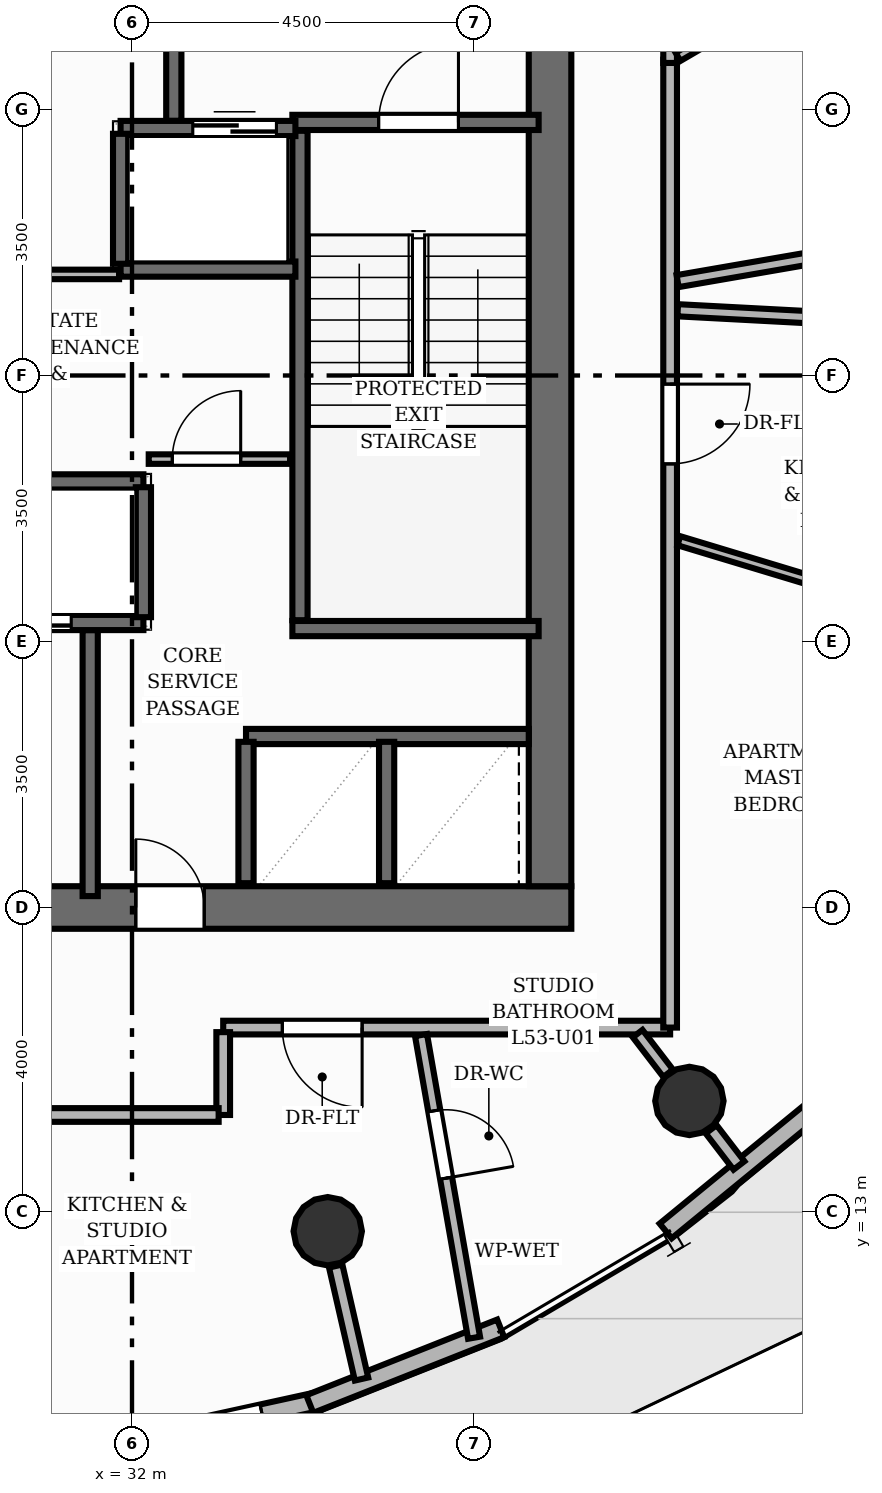
"""IFC4 building model, lengths in metres.
Left out: names, types, materials, properties, quantities, classifications, styles, units other than length and angle.
Written with IfcOpenShell. Run it as: python <this file> out.ifc"""

import sys

from ifc_helpers import new_model, si_unit, direction, frame, frame_2d, origin, origin_2d, place, context, subcontext, project, spatial, rectangle, circle, extrude, element, fill, save


model = new_model("IFC4")
c1 = context("Model", 3, precision=1e-05, world=origin(), true_north=direction((0.0, 1.0)))
c2 = subcontext(c1, "Body", "Model", "MODEL_VIEW")
j1 = project(units=[si_unit("LENGTHUNIT", "METRE"), si_unit("PLANEANGLEUNIT", "RADIAN")], contexts=[c1])
p1 = place(None, origin())
s1 = spatial("IfcSite", under=j1, at=p1, CompositionType="ELEMENT")
p2 = place(p1, origin())
s2 = spatial("IfcBuilding", under=s1, at=p2, CompositionType="ELEMENT")
p3 = place(p2, frame((0.0, 0.0, 179.04)))
s3 = spatial("IfcBuildingStorey", under=s2, at=p3, CompositionType="ELEMENT", Elevation=179.04)
p4 = place(p3, frame((26.22, 17.0, 0.0), z_axis=(0.0, 0.0, 1.0), x_axis=(1.0, 0.0, 0.0)))
e1 = element("IfcWall", 1, at=p4, inside=s3, PredefinedType="SHEAR", context=c2, shape_type="SweptSolid", body=[
    extrude(rectangle(XDim=11.56, YDim=0.56, at=frame_2d((5.78, 0.0))), origin(), (0.0, 0.0, 1.0), 3.2),
])
p5 = place(p4, frame((2.28, 0.0, 0.0)))
e2 = element("IfcOpeningElement", 2, at=p5, cuts=e1, PredefinedType="OPENING", context=c2, shape_type="SweptSolid", body=[
    extrude(rectangle(XDim=1.1, YDim=2.15, at=frame_2d((0.55, 1.075))), frame((0.0, 0.29, 0.0), z_axis=(0.0, -1.0, 0.0), x_axis=(1.0, 0.0, 0.0)), (0.0, 0.0, 1.0), 0.58),
])
p6 = place(p4, frame((5.83, 0.0, 0.0)))
e3 = element("IfcOpeningElement", 3, at=p6, cuts=e1, PredefinedType="OPENING", context=c2, shape_type="SweptSolid", body=[
    extrude(rectangle(XDim=0.9, YDim=2.1, at=frame_2d((0.45, 1.05))), frame((0.0, 0.29, 0.0), z_axis=(0.0, -1.0, 0.0), x_axis=(1.0, 0.0, 0.0)), (0.0, 0.0, 1.0), 0.58),
])
p7 = place(p3, frame((37.5, 17.28, 0.0), z_axis=(0.0, 0.0, 1.0), x_axis=(0.0, 1.0, 0.0)))
e4 = element("IfcWall", 4, at=p7, inside=s3, PredefinedType="SHEAR", context=c2, shape_type="SweptSolid", body=[
    extrude(rectangle(XDim=13.44, YDim=0.56, at=frame_2d((6.72, 0.0))), origin(), (0.0, 0.0, 1.0), 3.2),
])
for number, where, z_axis, x_axis in (
    (5, (34.575, 12.74, 0.0), (0.0, 0.0, 1.0), (1.0, 0.0, 0.0)),
    (6, (39.333, 14.455, 0.0), (0.0, 0.0, 1.0), (1.0, 0.0, 0.0)),
):
    element("IfcColumn", number, at=place(p3, frame(where, z_axis=z_axis, x_axis=x_axis)), inside=s3, PredefinedType="COLUMN", context=c2, shape_type="SweptSolid", body=[
        extrude(circle(Radius=0.45, at=origin_2d()), origin(), (0.0, 0.0, 1.0), 3.2),
    ])
p8 = place(p3, frame((34.444, 10.499, 0.0), z_axis=(0.0, 0.0, 1.0), x_axis=(-0.976886196324, -0.213760051067, 0.0)))
e7 = element("IfcWall", 7, at=p8, inside=s3, PredefinedType="SOLIDWALL", context=c2, shape_type="SweptSolid", body=[
    extrude(rectangle(XDim=2.651, YDim=0.25, at=frame_2d((1.325, 0.0))), origin(), (0.0, 0.0, 1.0), 2.96),
])
p9 = place(p8, frame((0.751, 0.0, 0.0)))
e8 = element("IfcOpeningElement", 8, at=p9, cuts=e7, PredefinedType="OPENING", context=c2, shape_type="SweptSolid", body=[
    extrude(rectangle(XDim=1.15, YDim=2.2, at=frame_2d((0.575, 1.1))), frame((0.0, 0.135, 0.0), z_axis=(0.0, -1.0, 0.0), x_axis=(1.0, 0.0, 0.0)), (0.0, 0.0, 1.0), 0.27),
])
p10 = place(p3, frame((36.851, 11.462, 0.0), z_axis=(0.0, 0.0, 1.0), x_axis=(-0.929693178164, -0.368334894459, 0.0)))
e9 = element("IfcWall", 9, at=p10, inside=s3, PredefinedType="SOLIDWALL", context=c2, shape_type="SweptSolid", body=[
    extrude(rectangle(XDim=2.702, YDim=0.25, at=frame_2d((1.351, 0.0))), origin(), (0.0, 0.0, 1.0), 2.96),
])
p11 = place(p3, frame((41.155, 14.492, 0.0), z_axis=(0.0, 0.0, 1.0), x_axis=(-0.773491700486, -0.633806428872, 0.0)))
e10 = element("IfcWall", 10, at=p11, inside=s3, PredefinedType="SOLIDWALL", context=c2, shape_type="SweptSolid", body=[
    extrude(rectangle(XDim=2.758, YDim=0.25, at=frame_2d((1.379, 0.0))), origin(), (0.0, 0.0, 1.0), 2.96),
])
p12 = place(p3, frame((34.21, 20.78, 0.0), z_axis=(0.0, 0.0, 1.0), x_axis=(0.0, 1.0, 0.0)))
e11 = element("IfcWall", 11, at=p12, inside=s3, PredefinedType="SHEAR", context=c2, shape_type="SweptSolid", body=[
    extrude(rectangle(XDim=6.44, YDim=0.2, at=frame_2d((3.22, 0.0))), origin(), (0.0, 0.0, 1.0), 3.2),
])
p13 = place(p3, frame((34.11, 20.67, 0.0), z_axis=(0.0, 0.0, 1.0), x_axis=(1.0, 0.0, 0.0)))
e12 = element("IfcWall", 12, at=p13, inside=s3, PredefinedType="SHEAR", context=c2, shape_type="SweptSolid", body=[
    extrude(rectangle(XDim=3.24, YDim=0.2, at=frame_2d((1.62, 0.0))), origin(), (0.0, 0.0, 1.0), 3.2),
])
p14 = place(p3, frame((34.11, 27.33, 0.0), z_axis=(0.0, 0.0, 1.0), x_axis=(1.0, 0.0, 0.0)))
e13 = element("IfcWall", 13, at=p14, inside=s3, PredefinedType="SHEAR", context=c2, shape_type="SweptSolid", body=[
    extrude(rectangle(XDim=3.24, YDim=0.2, at=frame_2d((1.62, 0.0))), origin(), (0.0, 0.0, 1.0), 3.2),
])
p15 = place(p14, frame((1.135, 0.0, 0.0)))
e14 = element("IfcOpeningElement", 14, at=p15, cuts=e13, PredefinedType="OPENING", context=c2, shape_type="SweptSolid", body=[
    extrude(rectangle(XDim=1.05, YDim=2.15, at=frame_2d((0.525, 1.075))), frame((0.0, 0.11, 0.0), z_axis=(0.0, -1.0, 0.0), x_axis=(1.0, 0.0, 0.0)), (0.0, 0.0, 1.0), 0.22),
])
for number, where, z_axis, x_axis in (
    (15, (31.45, 17.15, 0.0), (0.0, 0.0, 1.0), (0.0, 1.0, 0.0)),
    (16, (32.55, 27.35, 0.0), (0.0, 0.0, 1.0), (0.0, 1.0, 0.0)),
):
    element("IfcWall", number, at=place(p3, frame(where, z_axis=z_axis, x_axis=x_axis)), inside=s3, PredefinedType="SHEAR", context=c2, shape_type="SweptSolid", body=[
        extrude(rectangle(XDim=3.5, YDim=0.2, at=frame_2d((1.75, 0.0))), origin(), (0.0, 0.0, 1.0), 3.2),
    ])
p16 = place(p3, frame((29.85, 20.75, 0.0), z_axis=(0.0, 0.0, 1.0), x_axis=(1.0, 0.0, 0.0)))
e17 = element("IfcWall", 17, at=p16, inside=s3, PredefinedType="SHEAR", context=c2, shape_type="SweptSolid", body=[
    extrude(rectangle(XDim=2.3, YDim=0.2, at=frame_2d((1.15, 0.0))), origin(), (0.0, 0.0, 1.0), 3.2),
])
p17 = place(p16, frame((0.25, 0.0, 0.0)))
e18 = element("IfcOpeningElement", 18, at=p17, cuts=e17, PredefinedType="OPENING", context=c2, shape_type="SweptSolid", body=[
    extrude(rectangle(XDim=1.1, YDim=2.15, at=frame_2d((0.55, 1.075))), frame((0.0, 0.11, 0.0), z_axis=(0.0, -1.0, 0.0), x_axis=(1.0, 0.0, 0.0)), (0.0, 0.0, 1.0), 0.22),
])
p18 = place(p3, frame((29.85, 22.6, 0.0), z_axis=(0.0, 0.0, 1.0), x_axis=(1.0, 0.0, 0.0)))
e19 = element("IfcWall", 19, at=p18, inside=s3, PredefinedType="SHEAR", context=c2, shape_type="SweptSolid", body=[
    extrude(rectangle(XDim=2.3, YDim=0.2, at=frame_2d((1.15, 0.0))), origin(), (0.0, 0.0, 1.0), 3.2),
])
p19 = place(p3, frame((32.15, 20.82, 0.0), z_axis=(0.0, 0.0, 1.0), x_axis=(0.0, 1.0, 0.0)))
e20 = element("IfcWall", 20, at=p19, inside=s3, PredefinedType="SHEAR", context=c2, shape_type="SweptSolid", body=[
    extrude(rectangle(XDim=1.71, YDim=0.2, at=frame_2d((0.855, 0.0))), origin(), (0.0, 0.0, 1.0), 3.2),
])
p20 = place(p3, frame((31.85, 27.25, 0.0), z_axis=(0.0, 0.0, 1.0), x_axis=(1.0, 0.0, 0.0)))
e21 = element("IfcWall", 21, at=p20, inside=s3, PredefinedType="SHEAR", context=c2, shape_type="SweptSolid", body=[
    extrude(rectangle(XDim=2.3, YDim=0.2, at=frame_2d((1.15, 0.0))), origin(), (0.0, 0.0, 1.0), 3.2),
])
p21 = place(p20, frame((0.95, 0.0, 0.0)))
e22 = element("IfcOpeningElement", 22, at=p21, cuts=e21, PredefinedType="OPENING", context=c2, shape_type="SweptSolid", body=[
    extrude(rectangle(XDim=1.1, YDim=2.15, at=frame_2d((0.55, 1.075))), frame((0.0, 0.11, 0.0), z_axis=(0.0, -1.0, 0.0), x_axis=(1.0, 0.0, 0.0)), (0.0, 0.0, 1.0), 0.22),
])
p22 = place(p3, frame((31.85, 25.4, 0.0), z_axis=(0.0, 0.0, 1.0), x_axis=(1.0, 0.0, 0.0)))
e23 = element("IfcWall", 23, at=p22, inside=s3, PredefinedType="SHEAR", context=c2, shape_type="SweptSolid", body=[
    extrude(rectangle(XDim=2.3, YDim=0.2, at=frame_2d((1.15, 0.0))), origin(), (0.0, 0.0, 1.0), 3.2),
])
p23 = place(p3, frame((31.85, 25.47, 0.0), z_axis=(0.0, 0.0, 1.0), x_axis=(0.0, 1.0, 0.0)))
e24 = element("IfcWall", 24, at=p23, inside=s3, PredefinedType="SHEAR", context=c2, shape_type="SweptSolid", body=[
    extrude(rectangle(XDim=1.71, YDim=0.2, at=frame_2d((0.855, 0.0))), origin(), (0.0, 0.0, 1.0), 3.2),
])
p24 = place(p3, frame((33.5, 19.25, 0.0), z_axis=(0.0, 0.0, 1.0), x_axis=(1.0, 0.0, 0.0)))
e25 = element("IfcWall", 25, at=p24, inside=s3, PredefinedType="SHEAR", context=c2, shape_type="SweptSolid", body=[
    extrude(rectangle(XDim=3.72, YDim=0.2, at=frame_2d((1.86, 0.0))), origin(), (0.0, 0.0, 1.0), 3.2),
])
for number, where, z_axis, x_axis in (
    (26, (33.5, 17.32, 0.0), (0.0, 0.0, 1.0), (0.0, 1.0, 0.0)),
    (27, (35.35, 17.32, 0.0), (0.0, 0.0, 1.0), (0.0, 1.0, 0.0)),
):
    element("IfcWall", number, at=place(p3, frame(where, z_axis=z_axis, x_axis=x_axis)), inside=s3, PredefinedType="SHEAR", context=c2, shape_type="SweptSolid", body=[
        extrude(rectangle(XDim=1.86, YDim=0.2, at=frame_2d((0.93, 0.0))), origin(), (0.0, 0.0, 1.0), 3.2),
    ])
p25 = place(p3, frame((32.22, 22.9, 0.0), z_axis=(0.0, 0.0, 1.0), x_axis=(1.0, 0.0, 0.0)))
e28 = element("IfcWall", 28, at=p25, inside=s3, PredefinedType="PARTITIONING", context=c2, shape_type="SweptSolid", body=[
    extrude(rectangle(XDim=1.86, YDim=0.125, at=frame_2d((0.93, 0.0))), origin(), (0.0, 0.0, 1.0), 2.955),
])
p26 = place(p25, frame((0.31, 0.0, 0.0)))
e29 = element("IfcOpeningElement", 29, at=p26, cuts=e28, PredefinedType="OPENING", context=c2, shape_type="SweptSolid", body=[
    extrude(rectangle(XDim=0.9, YDim=2.1, at=frame_2d((0.45, 1.05))), frame((0.0, 0.073, 0.0), z_axis=(0.0, -1.0, 0.0), x_axis=(1.0, 0.0, 0.0)), (0.0, 0.0, 1.0), 0.145),
])
p27 = place(p3, frame((29.89, 25.33, 0.0), z_axis=(0.0, 0.0, 1.0), x_axis=(1.0, 0.0, 0.0)))
e30 = element("IfcWall", 30, at=p27, inside=s3, PredefinedType="PARTITIONING", context=c2, shape_type="SweptSolid", body=[
    extrude(rectangle(XDim=1.94, YDim=0.125, at=frame_2d((0.97, 0.0))), origin(), (0.0, 0.0, 1.0), 2.955),
])
p28 = place(p3, frame((34.68, 12.282, 0.0), z_axis=(0.0, 0.0, 1.0), x_axis=(0.222976920769, -0.974823723965, 0.0)))
e31 = element("IfcWall", 31, at=p28, inside=s3, PredefinedType="PARTITIONING", context=c2, shape_type="SweptSolid", body=[
    extrude(rectangle(XDim=1.525, YDim=0.18, at=frame_2d((0.763, 0.0))), origin(), (0.0, 0.0, 1.0), 2.403),
])
p29 = place(p3, frame((39.62, 14.082, 0.0), z_axis=(0.0, 0.0, 1.0), x_axis=(0.609062571598, -0.793122174623, 0.0)))
e32 = element("IfcWall", 32, at=p29, inside=s3, PredefinedType="PARTITIONING", context=c2, shape_type="SweptSolid", body=[
    extrude(rectangle(XDim=0.601, YDim=0.18, at=frame_2d((0.3, 0.0))), origin(), (0.0, 0.0, 1.0), 2.403),
])
p30 = place(p3, frame((39.08, 15.42, 0.0), z_axis=(0.0, 0.0, 1.0), x_axis=(-1.0, 0.0, 0.0)))
e33 = element("IfcWall", 33, at=p30, inside=s3, PredefinedType="PARTITIONING", context=c2, shape_type="SweptSolid", body=[
    extrude(rectangle(XDim=5.88, YDim=0.18, at=frame_2d((2.94, 0.0))), origin(), (0.0, 0.0, 1.0), 2.955),
])
p31 = place(p30, frame((4.052, 0.0, 0.0)))
e34 = element("IfcOpeningElement", 34, at=p31, cuts=e33, PredefinedType="OPENING", context=c2, shape_type="SweptSolid", body=[
    extrude(rectangle(XDim=1.05, YDim=2.15, at=frame_2d((0.525, 1.075))), frame((0.0, 0.1, 0.0), z_axis=(0.0, -1.0, 0.0), x_axis=(1.0, 0.0, 0.0)), (0.0, 0.0, 1.0), 0.2),
])
p32 = place(p3, frame((33.2, 15.36, 0.0), z_axis=(0.0, 0.0, 1.0), x_axis=(0.0, -1.0, 0.0)))
e35 = element("IfcWall", 35, at=p32, inside=s3, PredefinedType="PARTITIONING", context=c2, shape_type="SweptSolid", body=[
    extrude(rectangle(XDim=1.09, YDim=0.18, at=frame_2d((0.545, 0.0))), origin(), (0.0, 0.0, 1.0), 2.955),
])
p33 = place(p3, frame((33.14, 14.27, 0.0), z_axis=(0.0, 0.0, 1.0), x_axis=(-1.0, 0.0, 0.0)))
e36 = element("IfcWall", 36, at=p33, inside=s3, PredefinedType="PARTITIONING", context=c2, shape_type="SweptSolid", body=[
    extrude(rectangle(XDim=2.34, YDim=0.18, at=frame_2d((1.17, 0.0))), origin(), (0.0, 0.0, 1.0), 2.955),
])
p34 = place(p3, frame((39.08, 28.156, 0.0), z_axis=(0.0, 0.0, 1.0), x_axis=(0.0, -1.0, 0.0)))
e37 = element("IfcWall", 37, at=p34, inside=s3, PredefinedType="PARTITIONING", context=c2, shape_type="SweptSolid", body=[
    extrude(rectangle(XDim=12.736, YDim=0.18, at=frame_2d((6.368, 0.0))), origin(), (0.0, 0.0, 1.0), 2.955),
])
p35 = place(p34, frame((4.269, 0.0, 0.0)))
e38 = element("IfcOpeningElement", 38, at=p35, cuts=e37, PredefinedType="OPENING", context=c2, shape_type="SweptSolid", body=[
    extrude(rectangle(XDim=1.05, YDim=2.15, at=frame_2d((0.525, 1.075))), frame((0.0, 0.1, 0.0), z_axis=(0.0, -1.0, 0.0), x_axis=(1.0, 0.0, 0.0)), (0.0, 0.0, 1.0), 0.2),
])
p36 = place(p3, frame((39.08, 32.58, 0.0), z_axis=(0.0, 0.0, 1.0), x_axis=(0.0, -1.0, 0.0)))
e39 = element("IfcWall", 39, at=p36, inside=s3, PredefinedType="PARTITIONING", context=c2, shape_type="SweptSolid", body=[
    extrude(rectangle(XDim=4.468, YDim=0.18, at=frame_2d((2.234, 0.0))), origin(), (0.0, 0.0, 1.0), 2.955),
])
p37 = place(p36, frame((2.246, 0.0, 0.0)))
e40 = element("IfcOpeningElement", 40, at=p37, cuts=e39, PredefinedType="OPENING", context=c2, shape_type="SweptSolid", body=[
    extrude(rectangle(XDim=1.05, YDim=2.15, at=frame_2d((0.525, 1.075))), frame((0.0, 0.1, 0.0), z_axis=(0.0, -1.0, 0.0), x_axis=(1.0, 0.0, 0.0)), (0.0, 0.0, 1.0), 0.2),
])
p38 = place(p3, frame((35.802, 15.322, 0.0), z_axis=(0.0, 0.0, 1.0), x_axis=(0.172579535558, -0.98499558573, 0.0)))
e41 = element("IfcWall", 41, at=p38, inside=s3, PredefinedType="PLUMBINGWALL", context=c2, shape_type="SweptSolid", body=[
    extrude(rectangle(XDim=4.043, YDim=0.16, at=frame_2d((2.021, 0.0))), origin(), (0.0, 0.0, 1.0), 2.692),
])
p39 = place(p38, frame((1.011, 0.0, 0.0)))
e42 = element("IfcOpeningElement", 42, at=p39, cuts=e41, PredefinedType="OPENING", context=c2, shape_type="SweptSolid", body=[
    extrude(rectangle(XDim=0.9, YDim=2.1, at=frame_2d((0.45, 1.05))), frame((0.0, 0.09, 0.0), z_axis=(0.0, -1.0, 0.0), x_axis=(1.0, 0.0, 0.0)), (0.0, 0.0, 1.0), 0.18),
])
p40 = place(p3, frame((38.653, 15.341, 0.0), z_axis=(0.0, 0.0, 1.0), x_axis=(0.609101063055, -0.79309261438, 0.0)))
e43 = element("IfcWall", 43, at=p40, inside=s3, PredefinedType="PLUMBINGWALL", context=c2, shape_type="SweptSolid", body=[
    extrude(rectangle(XDim=0.658, YDim=0.16, at=frame_2d((0.329, 0.0))), origin(), (0.0, 0.0, 1.0), 2.403),
])
p41 = place(p3, frame((39.18, 24.858, 0.0), z_axis=(0.0, 0.0, 1.0), x_axis=(0.998597105279, -0.05295112207, 0.0)))
e44 = element("IfcWall", 44, at=p41, inside=s3, PredefinedType="PLUMBINGWALL", context=c2, shape_type="SweptSolid", body=[
    extrude(rectangle(XDim=6.958, YDim=0.16, at=frame_2d((3.479, 0.0))), origin(), (0.0, 0.0, 1.0), 2.692),
])
p42 = place(p41, frame((3.029, 0.0, 0.0)))
e45 = element("IfcOpeningElement", 45, at=p42, cuts=e44, PredefinedType="OPENING", context=c2, shape_type="SweptSolid", body=[
    extrude(rectangle(XDim=0.9, YDim=2.1, at=frame_2d((0.45, 1.05))), frame((0.0, 0.09, 0.0), z_axis=(0.0, -1.0, 0.0), x_axis=(1.0, 0.0, 0.0)), (0.0, 0.0, 1.0), 0.18),
])
p43 = place(p3, frame((44.963, 20.083, 0.0), z_axis=(0.0, 0.0, 1.0), x_axis=(-0.95726021897, 0.289228064298, 0.0)))
e46 = element("IfcWall", 46, at=p43, inside=s3, PredefinedType="PARTITIONING", context=c2, shape_type="SweptSolid", body=[
    extrude(rectangle(XDim=6.026, YDim=0.125, at=frame_2d((3.013, 0.0))), origin(), (0.0, 0.0, 1.0), 2.692),
])
p44 = place(p43, frame((2.563, 0.0, 0.0)))
e47 = element("IfcOpeningElement", 47, at=p44, cuts=e46, PredefinedType="OPENING", context=c2, shape_type="SweptSolid", body=[
    extrude(rectangle(XDim=0.9, YDim=2.1, at=frame_2d((0.45, 1.05))), frame((0.0, 0.073, 0.0), z_axis=(0.0, -1.0, 0.0), x_axis=(1.0, 0.0, 0.0)), (0.0, 0.0, 1.0), 0.145),
])
p45 = place(p3, frame((39.178, 25.242, 0.0), z_axis=(0.0, 0.0, 1.0), x_axis=(0.985362047777, 0.170474733611, 0.0)))
e48 = element("IfcWall", 48, at=p45, inside=s3, PredefinedType="PLUMBINGWALL", context=c2, shape_type="SweptSolid", body=[
    extrude(rectangle(XDim=5.399, YDim=0.16, at=frame_2d((2.7, 0.0))), origin(), (0.0, 0.0, 1.0), 2.403),
])
p46 = place(p3, frame((42.58, 30.175, 0.0), z_axis=(0.0, 0.0, 1.0), x_axis=(-0.863675291667, -0.504048599407, 0.0)))
e49 = element("IfcWall", 49, at=p46, inside=s3, PredefinedType="PARTITIONING", context=c2, shape_type="SweptSolid", body=[
    extrude(rectangle(XDim=3.932, YDim=0.125, at=frame_2d((1.966, 0.0))), origin(), (0.0, 0.0, 1.0), 2.403),
])
p47 = place(p46, frame((1.516, 0.0, 0.0)))
e50 = element("IfcOpeningElement", 50, at=p47, cuts=e49, PredefinedType="OPENING", context=c2, shape_type="SweptSolid", body=[
    extrude(rectangle(XDim=0.9, YDim=2.1, at=frame_2d((0.45, 1.05))), frame((0.0, 0.073, 0.0), z_axis=(0.0, -1.0, 0.0), x_axis=(1.0, 0.0, 0.0)), (0.0, 0.0, 1.0), 0.145),
])
p48 = place(p9, origin())
e51 = element("IfcDoor", 51, at=p48, inside=s3, OperationType="SINGLE_SWING_RIGHT", PredefinedType="DOOR", context=c2, shape_type="SweptSolid", body=[
    extrude(rectangle(XDim=1.15, YDim=2.2, at=frame_2d((0.575, 1.1))), frame((0.0, 0.025, 0.0), z_axis=(0.0, -1.0, 0.0), x_axis=(1.0, 0.0, 0.0)), (0.0, 0.0, 1.0), 0.05),
])
fill(e8, e51)
p49 = place(p15, origin())
e52 = element("IfcDoor", 52, at=p49, inside=s3, OperationType="SINGLE_SWING_RIGHT", PredefinedType="DOOR", context=c2, shape_type="SweptSolid", body=[
    extrude(rectangle(XDim=1.05, YDim=2.15, at=frame_2d((0.525, 1.075))), frame((0.0, 0.025, 0.0), z_axis=(0.0, -1.0, 0.0), x_axis=(1.0, 0.0, 0.0)), (0.0, 0.0, 1.0), 0.05),
])
fill(e14, e52)
p50 = place(p17, origin())
e53 = element("IfcDoor", 53, at=p50, inside=s3, OperationType="DOUBLE_DOOR_SLIDING", PredefinedType="DOOR", context=c2, shape_type="SweptSolid", body=[
    extrude(rectangle(XDim=1.1, YDim=2.15, at=frame_2d((0.55, 1.075))), frame((0.0, 0.025, 0.0), z_axis=(0.0, -1.0, 0.0), x_axis=(1.0, 0.0, 0.0)), (0.0, 0.0, 1.0), 0.05),
])
fill(e18, e53)
p51 = place(p21, origin())
e54 = element("IfcDoor", 54, at=p51, inside=s3, OperationType="DOUBLE_DOOR_SLIDING", PredefinedType="DOOR", context=c2, shape_type="SweptSolid", body=[
    extrude(rectangle(XDim=1.1, YDim=2.15, at=frame_2d((0.55, 1.075))), frame((0.0, 0.025, 0.0), z_axis=(0.0, -1.0, 0.0), x_axis=(1.0, 0.0, 0.0)), (0.0, 0.0, 1.0), 0.05),
])
fill(e22, e54)
p52 = place(p6, origin())
e55 = element("IfcDoor", 55, at=p52, inside=s3, OperationType="SINGLE_SWING_LEFT", PredefinedType="DOOR", context=c2, shape_type="SweptSolid", body=[
    extrude(rectangle(XDim=0.9, YDim=2.1, at=frame_2d((0.45, 1.05))), frame((0.0, 0.025, 0.0), z_axis=(0.0, -1.0, 0.0), x_axis=(1.0, 0.0, 0.0)), (0.0, 0.0, 1.0), 0.05),
])
fill(e3, e55)
p53 = place(p26, origin())
e56 = element("IfcDoor", 56, at=p53, inside=s3, OperationType="SINGLE_SWING_RIGHT", PredefinedType="DOOR", context=c2, shape_type="SweptSolid", body=[
    extrude(rectangle(XDim=0.9, YDim=2.1, at=frame_2d((0.45, 1.05))), frame((0.0, 0.025, 0.0), z_axis=(0.0, -1.0, 0.0), x_axis=(1.0, 0.0, 0.0)), (0.0, 0.0, 1.0), 0.05),
])
fill(e29, e56)
p54 = place(p31, origin())
e57 = element("IfcDoor", 57, at=p54, inside=s3, OperationType="SINGLE_SWING_LEFT", PredefinedType="DOOR", context=c2, shape_type="SweptSolid", body=[
    extrude(rectangle(XDim=1.05, YDim=2.15, at=frame_2d((0.525, 1.075))), frame((0.0, 0.025, 0.0), z_axis=(0.0, -1.0, 0.0), x_axis=(1.0, 0.0, 0.0)), (0.0, 0.0, 1.0), 0.05),
])
fill(e34, e57)
p55 = place(p39, origin())
e58 = element("IfcDoor", 58, at=p55, inside=s3, OperationType="SINGLE_SWING_RIGHT", PredefinedType="DOOR", context=c2, shape_type="SweptSolid", body=[
    extrude(rectangle(XDim=0.9, YDim=2.1, at=frame_2d((0.45, 1.05))), frame((0.0, 0.025, 0.0), z_axis=(0.0, -1.0, 0.0), x_axis=(1.0, 0.0, 0.0)), (0.0, 0.0, 1.0), 0.05),
])
fill(e42, e58)
p56 = place(p35, origin())
e59 = element("IfcDoor", 59, at=p56, inside=s3, OperationType="SINGLE_SWING_LEFT", PredefinedType="DOOR", context=c2, shape_type="SweptSolid", body=[
    extrude(rectangle(XDim=1.05, YDim=2.15, at=frame_2d((0.525, 1.075))), frame((0.0, 0.025, 0.0), z_axis=(0.0, -1.0, 0.0), x_axis=(1.0, 0.0, 0.0)), (0.0, 0.0, 1.0), 0.05),
])
fill(e38, e59)
save(model, sys.argv[1])
